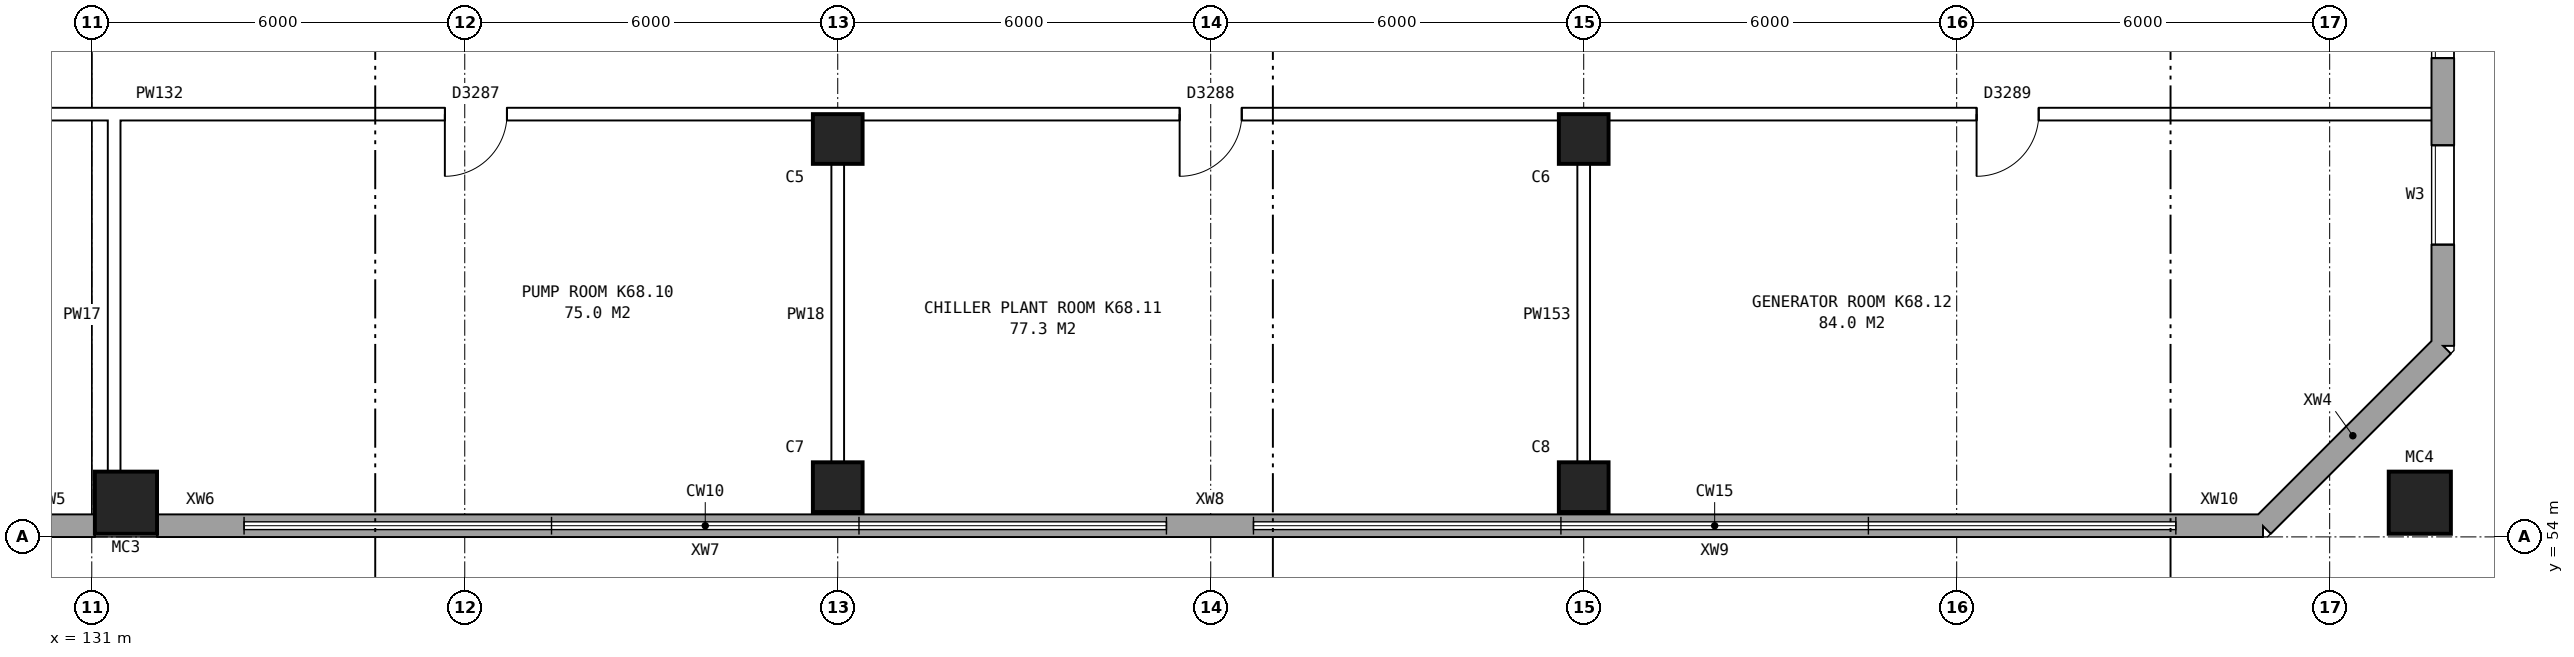
"""IFC4 building model, lengths in metres.
Left out: names, types, materials, properties, quantities, classifications, styles, units other than length and angle.
Written with IfcOpenShell. Run it as: python <this file> out.ifc"""

import sys

from ifc_helpers import new_model, si_unit, direction, frame, frame_2d, origin, origin_2d, place, context, subcontext, project, spatial, polyline, rectangle, hollow_rectangle, outline, extrude, element, fill, save


model = new_model("IFC4")
c1 = context("Model", 3, precision=1e-05, world=origin(), true_north=direction((0.0, 1.0)))
c2 = subcontext(c1, "Body", "Model", "MODEL_VIEW")
j1 = project(units=[si_unit("LENGTHUNIT", "METRE"), si_unit("PLANEANGLEUNIT", "RADIAN")], contexts=[c1])
p1 = place(None, origin())
s1 = spatial("IfcSite", under=j1, at=p1, CompositionType="ELEMENT")
p2 = place(p1, origin())
s2 = spatial("IfcBuilding", under=s1, at=p2, CompositionType="ELEMENT")
p3 = place(p2, frame((0.0, 0.0, 243.9)))
s3 = spatial("IfcBuildingStorey", under=s2, at=p3, CompositionType="ELEMENT", Elevation=243.9)
p4 = place(p3, frame((143.0, 54.8, 0.0), z_axis=(0.0, 0.0, 1.0), x_axis=(1.0, 0.0, 0.0)))
e1 = element("IfcColumn", 1, at=p4, inside=s3, PredefinedType="COLUMN", context=c2, shape_type="SweptSolid", body=[
    extrude(rectangle(XDim=0.8, YDim=0.8, at=origin_2d()), origin(), (0.0, 0.0, 1.0), 3.163),
])
p5 = place(p3, frame((143.0, 60.4, 0.0), z_axis=(0.0, 0.0, 1.0), x_axis=(1.0, 0.0, 0.0)))
e2 = element("IfcColumn", 2, at=p5, inside=s3, PredefinedType="COLUMN", context=c2, shape_type="SweptSolid", body=[
    extrude(rectangle(XDim=0.8, YDim=0.8, at=origin_2d()), origin(), (0.0, 0.0, 1.0), 5.963),
])
p6 = place(p3, frame((155.0, 54.8, 0.0), z_axis=(0.0, 0.0, 1.0), x_axis=(1.0, 0.0, 0.0)))
e3 = element("IfcColumn", 3, at=p6, inside=s3, PredefinedType="COLUMN", context=c2, shape_type="SweptSolid", body=[
    extrude(rectangle(XDim=0.8, YDim=0.8, at=origin_2d()), origin(), (0.0, 0.0, 1.0), 3.163),
])
p7 = place(p3, frame((155.0, 60.4, 0.0), z_axis=(0.0, 0.0, 1.0), x_axis=(1.0, 0.0, 0.0)))
e4 = element("IfcColumn", 4, at=p7, inside=s3, PredefinedType="COLUMN", context=c2, shape_type="SweptSolid", body=[
    extrude(rectangle(XDim=0.8, YDim=0.8, at=origin_2d()), origin(), (0.0, 0.0, 1.0), 5.963),
])
for number, where, z_axis, x_axis in (
    (5, (131.55, 54.55, 0.0), (0.0, 0.0, 1.0), (1.0, 0.0, 0.0)),
    (6, (168.45, 54.55, 0.0), (0.0, 0.0, 1.0), (1.0, 0.0, 0.0)),
):
    element("IfcColumn", number, at=place(p3, frame(where, z_axis=z_axis, x_axis=x_axis)), inside=s3, PredefinedType="COLUMN", context=c2, shape_type="SweptSolid", body=[
        extrude(hollow_rectangle(XDim=1.0, YDim=1.0, WallThickness=0.055, at=origin_2d()), origin(), (0.0, 0.0, 1.0), 3.038),
    ])
p8 = place(p3, frame((129.65, 54.18, 0.0), z_axis=(0.0, 0.0, 1.0), x_axis=(1.0, 0.0, 0.0)))
e7 = element("IfcWall", 7, at=p8, inside=s3, PredefinedType="STANDARD", context=c2, shape_type="SweptSolid", body=[
    extrude(rectangle(XDim=1.4, YDim=0.36, at=frame_2d((0.7, 0.0))), origin(), (0.0, 0.0, 1.0), 3.39),
])
p9 = place(p3, frame((132.05, 54.18, 0.0), z_axis=(0.0, 0.0, 1.0), x_axis=(1.0, 0.0, 0.0)))
e8 = element("IfcWall", 8, at=p9, inside=s3, PredefinedType="STANDARD", context=c2, shape_type="SweptSolid", body=[
    extrude(rectangle(XDim=1.4, YDim=0.36, at=frame_2d((0.7, 0.0))), origin(), (0.0, 0.0, 1.0), 3.39),
])
p10 = place(p3, frame((133.45, 54.18, 0.0), z_axis=(0.0, 0.0, 1.0), x_axis=(1.0, 0.0, 0.0)))
e9 = element("IfcWall", 9, at=p10, inside=s3, PredefinedType="STANDARD", context=c2, shape_type="SweptSolid", body=[
    extrude(rectangle(XDim=14.838, YDim=0.36, at=frame_2d((7.419, 0.0))), origin(), (0.0, 0.0, 1.0), 1.1),
])
p11 = place(p3, frame((148.288, 54.18, 0.0), z_axis=(0.0, 0.0, 1.0), x_axis=(1.0, 0.0, 0.0)))
e10 = element("IfcWall", 10, at=p11, inside=s3, PredefinedType="STANDARD", context=c2, shape_type="SweptSolid", body=[
    extrude(rectangle(XDim=1.4, YDim=0.36, at=frame_2d((0.7, 0.0))), origin(), (0.0, 0.0, 1.0), 3.39),
])
p12 = place(p3, frame((149.688, 54.18, 0.0), z_axis=(0.0, 0.0, 1.0), x_axis=(1.0, 0.0, 0.0)))
e11 = element("IfcWall", 11, at=p12, inside=s3, PredefinedType="STANDARD", context=c2, shape_type="SweptSolid", body=[
    extrude(rectangle(XDim=14.838, YDim=0.36, at=frame_2d((7.419, 0.0))), origin(), (0.0, 0.0, 1.0), 1.1),
])
p13 = place(p3, frame((164.525, 54.18, 0.0), z_axis=(0.0, 0.0, 1.0), x_axis=(1.0, 0.0, 0.0)))
e12 = element("IfcWall", 12, at=p13, inside=s3, PredefinedType="STANDARD", context=c2, shape_type="SweptSolid", body=[
    extrude(rectangle(XDim=1.4, YDim=0.36, at=frame_2d((0.7, 0.0))), origin(), (0.0, 0.0, 1.0), 3.39),
])
p14 = place(p3, frame((165.925, 54.18, 0.0), z_axis=(0.0, 0.0, 1.0), x_axis=(0.707106781187, 0.707106781187, 0.0)))
e13 = element("IfcWall", 13, at=p14, inside=s3, PredefinedType="STANDARD", context=c2, shape_type="SweptSolid", body=[
    extrude(outline(polyline([(0.0, 0.0), (4.094, 0.0), (4.094, 4.837), (0.0, 3.39), (0.0, 0.0)])), frame((0.0, 0.18, 0.0), z_axis=(0.0, -1.0, 0.0), x_axis=(1.0, 0.0, 0.0)), (0.0, 0.0, 1.0), 0.36),
])
p15 = place(p3, frame((168.82, 57.075, 0.0), z_axis=(0.0, 0.0, 1.0), x_axis=(0.0, 1.0, 0.0)))
e14 = element("IfcWall", 14, at=p15, inside=s3, PredefinedType="STANDARD", context=c2, shape_type="SweptSolid", body=[
    extrude(outline(polyline([(0.0, 0.0), (25.851, 0.0), (25.851, 17.763), (0.0, 4.837), (0.0, 0.0)])), frame((0.0, 0.18, 0.0), z_axis=(0.0, -1.0, 0.0), x_axis=(1.0, 0.0, 0.0)), (0.0, 0.0, 1.0), 0.36),
])
p16 = place(p15, frame((1.625, 0.0, 1.5)))
e15 = element("IfcOpeningElement", 15, at=p16, cuts=e14, PredefinedType="OPENING", context=c2, shape_type="SweptSolid", body=[
    extrude(rectangle(XDim=1.6, YDim=1.2, at=frame_2d((0.8, 0.6))), frame((0.0, 0.19, 0.0), z_axis=(0.0, -1.0, 0.0), x_axis=(1.0, 0.0, 0.0)), (0.0, 0.0, 1.0), 0.38),
])
p17 = place(p15, frame((4.625, 0.0, 1.5)))
e16 = element("IfcOpeningElement", 16, at=p17, cuts=e14, PredefinedType="OPENING", context=c2, shape_type="SweptSolid", body=[
    extrude(rectangle(XDim=1.6, YDim=1.2, at=frame_2d((0.8, 0.6))), frame((0.0, 0.19, 0.0), z_axis=(0.0, -1.0, 0.0), x_axis=(1.0, 0.0, 0.0)), (0.0, 0.0, 1.0), 0.38),
])
p18 = place(p15, frame((19.625, 0.0, 1.5)))
e17 = element("IfcOpeningElement", 17, at=p18, cuts=e14, PredefinedType="OPENING", context=c2, shape_type="SweptSolid", body=[
    extrude(rectangle(XDim=1.6, YDim=1.2, at=frame_2d((0.8, 0.6))), frame((0.0, 0.19, 0.0), z_axis=(0.0, -1.0, 0.0), x_axis=(1.0, 0.0, 0.0)), (0.0, 0.0, 1.0), 0.38),
])
p19 = place(p15, frame((22.625, 0.0, 1.5)))
e18 = element("IfcOpeningElement", 18, at=p19, cuts=e14, PredefinedType="OPENING", context=c2, shape_type="SweptSolid", body=[
    extrude(rectangle(XDim=1.6, YDim=1.2, at=frame_2d((0.8, 0.6))), frame((0.0, 0.19, 0.0), z_axis=(0.0, -1.0, 0.0), x_axis=(1.0, 0.0, 0.0)), (0.0, 0.0, 1.0), 0.38),
])
p20 = place(p3, frame((32.24, 60.8, 0.0), z_axis=(0.0, 0.0, 1.0), x_axis=(1.0, 0.0, 0.0)))
e19 = element("IfcWall", 19, at=p20, inside=s3, PredefinedType="PARTITIONING", context=c2, shape_type="SweptSolid", body=[
    extrude(rectangle(XDim=136.52, YDim=0.2, at=frame_2d((68.26, 0.0))), origin(), (0.0, 0.0, 1.0), 3.3),
])
p21 = place(p20, frame((4.94, 0.0, 0.0)))
e20 = element("IfcOpeningElement", 20, at=p21, cuts=e19, PredefinedType="OPENING", context=c2, shape_type="SweptSolid", body=[
    extrude(rectangle(XDim=1.0, YDim=2.1, at=frame_2d((0.5, 1.05))), frame((0.0, 0.11, 0.0), z_axis=(0.0, -1.0, 0.0), x_axis=(1.0, 0.0, 0.0)), (0.0, 0.0, 1.0), 0.22),
])
p22 = place(p20, frame((14.76, 0.0, 0.0)))
e21 = element("IfcOpeningElement", 21, at=p22, cuts=e19, PredefinedType="OPENING", context=c2, shape_type="SweptSolid", body=[
    extrude(rectangle(XDim=1.0, YDim=2.1, at=frame_2d((0.5, 1.05))), frame((0.0, 0.11, 0.0), z_axis=(0.0, -1.0, 0.0), x_axis=(1.0, 0.0, 0.0)), (0.0, 0.0, 1.0), 0.22),
])
p23 = place(p20, frame((25.26, 0.0, 0.0)))
e22 = element("IfcOpeningElement", 22, at=p23, cuts=e19, PredefinedType="OPENING", context=c2, shape_type="SweptSolid", body=[
    extrude(rectangle(XDim=1.0, YDim=2.1, at=frame_2d((0.5, 1.05))), frame((0.0, 0.11, 0.0), z_axis=(0.0, -1.0, 0.0), x_axis=(1.0, 0.0, 0.0)), (0.0, 0.0, 1.0), 0.22),
])
p24 = place(p20, frame((37.08, 0.0, 0.0)))
e23 = element("IfcOpeningElement", 23, at=p24, cuts=e19, PredefinedType="OPENING", context=c2, shape_type="SweptSolid", body=[
    extrude(rectangle(XDim=1.0, YDim=2.1, at=frame_2d((0.5, 1.05))), frame((0.0, 0.11, 0.0), z_axis=(0.0, -1.0, 0.0), x_axis=(1.0, 0.0, 0.0)), (0.0, 0.0, 1.0), 0.22),
])
p25 = place(p20, frame((53.392, 0.0, 0.0)))
e24 = element("IfcOpeningElement", 24, at=p25, cuts=e19, PredefinedType="OPENING", context=c2, shape_type="SweptSolid", body=[
    extrude(rectangle(XDim=1.0, YDim=2.1, at=frame_2d((0.5, 1.05))), frame((0.0, 0.11, 0.0), z_axis=(0.0, -1.0, 0.0), x_axis=(1.0, 0.0, 0.0)), (0.0, 0.0, 1.0), 0.22),
])
p26 = place(p20, frame((74.198, 0.0, 0.0)))
e25 = element("IfcOpeningElement", 25, at=p26, cuts=e19, PredefinedType="OPENING", context=c2, shape_type="SweptSolid", body=[
    extrude(rectangle(XDim=1.0, YDim=2.1, at=frame_2d((0.5, 1.05))), frame((0.0, 0.11, 0.0), z_axis=(0.0, -1.0, 0.0), x_axis=(1.0, 0.0, 0.0)), (0.0, 0.0, 1.0), 0.22),
])
p27 = place(p20, frame((91.565, 0.0, 0.0)))
e26 = element("IfcOpeningElement", 26, at=p27, cuts=e19, PredefinedType="OPENING", context=c2, shape_type="SweptSolid", body=[
    extrude(rectangle(XDim=1.0, YDim=2.1, at=frame_2d((0.5, 1.05))), frame((0.0, 0.11, 0.0), z_axis=(0.0, -1.0, 0.0), x_axis=(1.0, 0.0, 0.0)), (0.0, 0.0, 1.0), 0.22),
])
p28 = place(p20, frame((104.44, 0.0, 0.0)))
e27 = element("IfcOpeningElement", 27, at=p28, cuts=e19, PredefinedType="OPENING", context=c2, shape_type="SweptSolid", body=[
    extrude(rectangle(XDim=1.0, YDim=2.1, at=frame_2d((0.5, 1.05))), frame((0.0, 0.11, 0.0), z_axis=(0.0, -1.0, 0.0), x_axis=(1.0, 0.0, 0.0)), (0.0, 0.0, 1.0), 0.22),
])
p29 = place(p20, frame((116.26, 0.0, 0.0)))
e28 = element("IfcOpeningElement", 28, at=p29, cuts=e19, PredefinedType="OPENING", context=c2, shape_type="SweptSolid", body=[
    extrude(rectangle(XDim=1.0, YDim=2.1, at=frame_2d((0.5, 1.05))), frame((0.0, 0.11, 0.0), z_axis=(0.0, -1.0, 0.0), x_axis=(1.0, 0.0, 0.0)), (0.0, 0.0, 1.0), 0.22),
])
p30 = place(p20, frame((129.08, 0.0, 0.0)))
e29 = element("IfcOpeningElement", 29, at=p30, cuts=e19, PredefinedType="OPENING", context=c2, shape_type="SweptSolid", body=[
    extrude(rectangle(XDim=1.0, YDim=2.1, at=frame_2d((0.5, 1.05))), frame((0.0, 0.11, 0.0), z_axis=(0.0, -1.0, 0.0), x_axis=(1.0, 0.0, 0.0)), (0.0, 0.0, 1.0), 0.22),
])
for number, where, z_axis, x_axis in (
    (30, (131.36, 54.24, 0.0), (0.0, 0.0, 1.0), (0.0, 1.0, 0.0)),
    (31, (143.0, 54.24, 0.0), (0.0, 0.0, 1.0), (0.0, 1.0, 0.0)),
    (32, (155.0, 54.24, 0.0), (0.0, 0.0, 1.0), (0.0, 1.0, 0.0)),
):
    element("IfcWall", number, at=place(p3, frame(where, z_axis=z_axis, x_axis=x_axis)), inside=s3, PredefinedType="PARTITIONING", context=c2, shape_type="SweptSolid", body=[
        extrude(rectangle(XDim=6.66, YDim=0.2, at=frame_2d((3.33, 0.0))), origin(), (0.0, 0.0, 1.0), 3.3),
    ])
p31 = place(p16, origin())
e33 = element("IfcWindow", 33, at=p31, inside=s3, PartitioningType="DOUBLE_PANEL_HORIZONTAL", PredefinedType="WINDOW", context=c2, shape_type="SweptSolid", body=[
    extrude(rectangle(XDim=1.6, YDim=1.2, at=frame_2d((0.8, 0.6))), frame((0.0, 0.15, 0.0), z_axis=(0.0, -1.0, 0.0), x_axis=(1.0, 0.0, 0.0)), (0.0, 0.0, 1.0), 0.06),
])
fill(e15, e33)
p32 = place(p17, origin())
e34 = element("IfcWindow", 34, at=p32, inside=s3, PartitioningType="DOUBLE_PANEL_HORIZONTAL", PredefinedType="WINDOW", context=c2, shape_type="SweptSolid", body=[
    extrude(rectangle(XDim=1.6, YDim=1.2, at=frame_2d((0.8, 0.6))), frame((0.0, 0.15, 0.0), z_axis=(0.0, -1.0, 0.0), x_axis=(1.0, 0.0, 0.0)), (0.0, 0.0, 1.0), 0.06),
])
fill(e16, e34)
p33 = place(p28, frame((1.0, 0.0, 0.0), z_axis=(0.0, 0.0, 1.0), x_axis=(-1.0, 0.0, 0.0)))
e35 = element("IfcDoor", 35, at=p33, inside=s3, OperationType="SINGLE_SWING_RIGHT", PredefinedType="DOOR", context=c2, shape_type="SweptSolid", body=[
    extrude(rectangle(XDim=1.0, YDim=2.1, at=frame_2d((0.5, 1.05))), frame((0.0, 0.025, 0.0), z_axis=(0.0, -1.0, 0.0), x_axis=(1.0, 0.0, 0.0)), (0.0, 0.0, 1.0), 0.05),
])
fill(e27, e35)
p34 = place(p29, frame((1.0, 0.0, 0.0), z_axis=(0.0, 0.0, 1.0), x_axis=(-1.0, 0.0, 0.0)))
e36 = element("IfcDoor", 36, at=p34, inside=s3, OperationType="SINGLE_SWING_RIGHT", PredefinedType="DOOR", context=c2, shape_type="SweptSolid", body=[
    extrude(rectangle(XDim=1.0, YDim=2.1, at=frame_2d((0.5, 1.05))), frame((0.0, 0.025, 0.0), z_axis=(0.0, -1.0, 0.0), x_axis=(1.0, 0.0, 0.0)), (0.0, 0.0, 1.0), 0.05),
])
fill(e28, e36)
p35 = place(p30, frame((1.0, 0.0, 0.0), z_axis=(0.0, 0.0, 1.0), x_axis=(-1.0, 0.0, 0.0)))
e37 = element("IfcDoor", 37, at=p35, inside=s3, OperationType="SINGLE_SWING_RIGHT", PredefinedType="DOOR", context=c2, shape_type="SweptSolid", body=[
    extrude(rectangle(XDim=1.0, YDim=2.1, at=frame_2d((0.5, 1.05))), frame((0.0, 0.025, 0.0), z_axis=(0.0, -1.0, 0.0), x_axis=(1.0, 0.0, 0.0)), (0.0, 0.0, 1.0), 0.05),
])
fill(e29, e37)
save(model, sys.argv[1])
